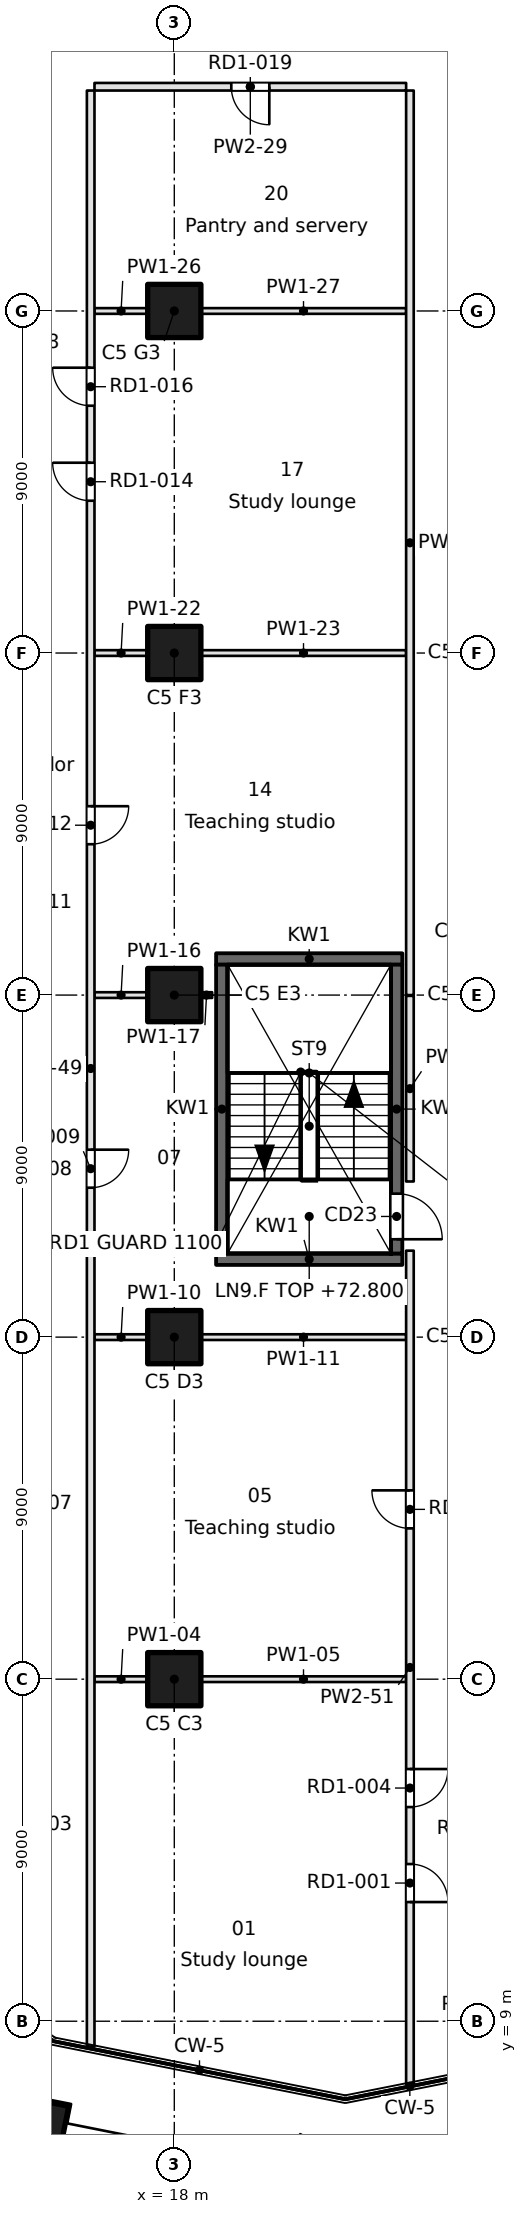
"""IFC4 building model, lengths in metres.
Left out: names, types, materials, properties, quantities, classifications, styles, units other than length and angle.
Written with IfcOpenShell. Run it as: python <this file> out.ifc"""

import sys

from ifc_helpers import new_model, si_unit, direction, frame, frame_2d, origin, origin_2d, place, context, subcontext, project, spatial, rectangle, extrude, element, fill, save


model = new_model("IFC4")
c1 = context("Model", 3, precision=1e-05, world=origin(), true_north=direction((0.0, 1.0)))
c2 = subcontext(c1, "Body", "Model", "MODEL_VIEW")
j1 = project(units=[si_unit("LENGTHUNIT", "METRE"), si_unit("PLANEANGLEUNIT", "RADIAN")], contexts=[c1])
p1 = place(None, origin())
s1 = spatial("IfcSite", under=j1, at=p1, CompositionType="ELEMENT")
p2 = place(p1, origin())
s2 = spatial("IfcBuilding", under=s1, at=p2, CompositionType="ELEMENT")
p3 = place(p2, frame((0.0, 0.0, 72.8)))
s3 = spatial("IfcBuildingStorey", under=s2, at=p3, CompositionType="ELEMENT", Elevation=72.8)
p4 = place(p3, frame((13.89, 6.213, 0.0), z_axis=(0.0, 0.0, 1.0), x_axis=(-0.980785280403, 0.195090322016, 0.0)))
e1 = element("IfcColumn", 1, at=p4, inside=s3, PredefinedType="COLUMN", context=c2, shape_type="SweptSolid", body=[
    extrude(rectangle(XDim=2.4, YDim=1.6, at=origin_2d()), origin(), (0.0, 0.0, 1.0), 3.7),
])
for number, where, z_axis, x_axis in (
    (2, (18.0, 18.0, 0.0), (0.0, 0.0, 1.0), (1.0, 0.0, 0.0)),
    (3, (18.0, 27.0, 0.0), (0.0, 0.0, 1.0), (1.0, 0.0, 0.0)),
    (4, (18.0, 36.0, 0.0), (0.0, 0.0, 1.0), (1.0, 0.0, 0.0)),
    (5, (18.0, 45.0, 0.0), (0.0, 0.0, 1.0), (1.0, 0.0, 0.0)),
    (6, (18.0, 54.0, 0.0), (0.0, 0.0, 1.0), (1.0, 0.0, 0.0)),
):
    element("IfcColumn", number, at=place(p3, frame(where, z_axis=z_axis, x_axis=x_axis)), inside=s3, PredefinedType="COLUMN", context=c2, shape_type="SweptSolid", body=[
        extrude(rectangle(XDim=1.4, YDim=1.4, at=origin_2d()), origin(), (0.0, 0.0, 1.0), 3.7),
    ])
for number, where, z_axis, x_axis in (
    (7, (19.1, 29.05, -0.4), (0.0, 0.0, 1.0), (1.0, 0.0, 0.0)),
    (8, (19.1, 36.95, -0.4), (0.0, 0.0, 1.0), (1.0, 0.0, 0.0)),
):
    element("IfcWall", number, at=place(p3, frame(where, z_axis=z_axis, x_axis=x_axis)), inside=s3, PredefinedType="SOLIDWALL", context=c2, shape_type="SweptSolid", body=[
        extrude(rectangle(XDim=4.9, YDim=0.3, at=frame_2d((2.45, 0.0))), origin(), (0.0, 0.0, 1.0), 3.7),
    ])
p5 = place(p3, frame((19.25, 29.2, -0.4), z_axis=(0.0, 0.0, 1.0), x_axis=(0.0, 1.0, 0.0)))
e9 = element("IfcWall", 9, at=p5, inside=s3, PredefinedType="SOLIDWALL", context=c2, shape_type="SweptSolid", body=[
    extrude(rectangle(XDim=7.6, YDim=0.3, at=frame_2d((3.8, 0.0))), origin(), (0.0, 0.0, 1.0), 3.7),
])
p6 = place(p3, frame((23.85, 29.2, -0.4), z_axis=(0.0, 0.0, 1.0), x_axis=(0.0, 1.0, 0.0)))
e10 = element("IfcWall", 10, at=p6, inside=s3, PredefinedType="SOLIDWALL", context=c2, shape_type="SweptSolid", body=[
    extrude(rectangle(XDim=7.6, YDim=0.3, at=frame_2d((3.8, 0.0))), origin(), (0.0, 0.0, 1.0), 3.7),
])
p7 = place(p6, frame((0.375, 0.0, 0.4)))
e11 = element("IfcOpeningElement", 11, at=p7, cuts=e10, PredefinedType="OPENING", context=c2, shape_type="SweptSolid", body=[
    extrude(rectangle(XDim=1.2, YDim=2.1, at=frame_2d((0.6, 1.05))), frame((0.0, 0.15, 0.0), z_axis=(0.0, -1.0, 0.0), x_axis=(1.0, 0.0, 0.0)), (0.0, 0.0, 1.0), 0.3),
])
p8 = place(p3, frame((15.9, 18.0, 0.0), z_axis=(0.0, 0.0, 1.0), x_axis=(1.0, 0.0, 0.0)))
e12 = element("IfcWall", 12, at=p8, inside=s3, PredefinedType="PARTITIONING", context=c2, shape_type="SweptSolid", body=[
    extrude(rectangle(XDim=1.4, YDim=0.15, at=frame_2d((0.7, 0.0))), origin(), (0.0, 0.0, 1.0), 3.3),
])
p9 = place(p3, frame((18.7, 18.0, 0.0), z_axis=(0.0, 0.0, 1.0), x_axis=(1.0, 0.0, 0.0)))
e13 = element("IfcWall", 13, at=p9, inside=s3, PredefinedType="PARTITIONING", context=c2, shape_type="SweptSolid", body=[
    extrude(rectangle(XDim=5.4, YDim=0.15, at=frame_2d((2.7, 0.0))), origin(), (0.0, 0.0, 1.0), 3.3),
])
p10 = place(p3, frame((15.9, 27.0, 0.0), z_axis=(0.0, 0.0, 1.0), x_axis=(1.0, 0.0, 0.0)))
e14 = element("IfcWall", 14, at=p10, inside=s3, PredefinedType="PARTITIONING", context=c2, shape_type="SweptSolid", body=[
    extrude(rectangle(XDim=1.4, YDim=0.15, at=frame_2d((0.7, 0.0))), origin(), (0.0, 0.0, 1.0), 3.3),
])
p11 = place(p3, frame((18.7, 27.0, 0.0), z_axis=(0.0, 0.0, 1.0), x_axis=(1.0, 0.0, 0.0)))
e15 = element("IfcWall", 15, at=p11, inside=s3, PredefinedType="PARTITIONING", context=c2, shape_type="SweptSolid", body=[
    extrude(rectangle(XDim=5.4, YDim=0.15, at=frame_2d((2.7, 0.0))), origin(), (0.0, 0.0, 1.0), 3.3),
])
p12 = place(p3, frame((15.9, 36.0, 0.0), z_axis=(0.0, 0.0, 1.0), x_axis=(1.0, 0.0, 0.0)))
e16 = element("IfcWall", 16, at=p12, inside=s3, PredefinedType="PARTITIONING", context=c2, shape_type="SweptSolid", body=[
    extrude(rectangle(XDim=1.4, YDim=0.15, at=frame_2d((0.7, 0.0))), origin(), (0.0, 0.0, 1.0), 3.3),
])
p13 = place(p3, frame((18.7, 36.0, 0.0), z_axis=(0.0, 0.0, 1.0), x_axis=(1.0, 0.0, 0.0)))
e17 = element("IfcWall", 17, at=p13, inside=s3, PredefinedType="PARTITIONING", context=c2, shape_type="SweptSolid", body=[
    extrude(rectangle(XDim=0.296, YDim=0.15, at=frame_2d((0.148, 0.0))), origin(), (0.0, 0.0, 1.0), 3.3),
])
p14 = place(p3, frame((15.9, 45.0, 0.0), z_axis=(0.0, 0.0, 1.0), x_axis=(1.0, 0.0, 0.0)))
e18 = element("IfcWall", 18, at=p14, inside=s3, PredefinedType="PARTITIONING", context=c2, shape_type="SweptSolid", body=[
    extrude(rectangle(XDim=1.4, YDim=0.15, at=frame_2d((0.7, 0.0))), origin(), (0.0, 0.0, 1.0), 3.3),
])
p15 = place(p3, frame((18.7, 45.0, 0.0), z_axis=(0.0, 0.0, 1.0), x_axis=(1.0, 0.0, 0.0)))
e19 = element("IfcWall", 19, at=p15, inside=s3, PredefinedType="PARTITIONING", context=c2, shape_type="SweptSolid", body=[
    extrude(rectangle(XDim=5.4, YDim=0.15, at=frame_2d((2.7, 0.0))), origin(), (0.0, 0.0, 1.0), 3.3),
])
p16 = place(p3, frame((15.9, 54.0, 0.0), z_axis=(0.0, 0.0, 1.0), x_axis=(1.0, 0.0, 0.0)))
e20 = element("IfcWall", 20, at=p16, inside=s3, PredefinedType="PARTITIONING", context=c2, shape_type="SweptSolid", body=[
    extrude(rectangle(XDim=1.4, YDim=0.15, at=frame_2d((0.7, 0.0))), origin(), (0.0, 0.0, 1.0), 3.3),
])
p17 = place(p3, frame((18.7, 54.0, 0.0), z_axis=(0.0, 0.0, 1.0), x_axis=(1.0, 0.0, 0.0)))
e21 = element("IfcWall", 21, at=p17, inside=s3, PredefinedType="PARTITIONING", context=c2, shape_type="SweptSolid", body=[
    extrude(rectangle(XDim=5.4, YDim=0.15, at=frame_2d((2.7, 0.0))), origin(), (0.0, 0.0, 1.0), 3.3),
])
p18 = place(p3, frame((24.1, 59.9, 0.0), z_axis=(0.0, 0.0, 1.0), x_axis=(-1.0, 0.0, 0.0)))
e22 = element("IfcWall", 22, at=p18, inside=s3, PredefinedType="PARTITIONING", context=c2, shape_type="SweptSolid", body=[
    extrude(rectangle(XDim=8.2, YDim=0.2, at=frame_2d((4.1, 0.0))), origin(), (0.0, 0.0, 1.0), 3.3),
])
p19 = place(p18, frame((3.6, 0.0, 0.0)))
e23 = element("IfcOpeningElement", 23, at=p19, cuts=e22, PredefinedType="OPENING", context=c2, shape_type="SweptSolid", body=[
    extrude(rectangle(XDim=1.0, YDim=2.1, at=frame_2d((0.5, 1.05))), frame((0.0, 0.1, 0.0), z_axis=(0.0, -1.0, 0.0), x_axis=(1.0, 0.0, 0.0)), (0.0, 0.0, 1.0), 0.2),
])
p20 = place(p3, frame((15.8, 59.8, 0.0), z_axis=(0.0, 0.0, 1.0), x_axis=(0.0, -1.0, 0.0)))
e24 = element("IfcWall", 24, at=p20, inside=s3, PredefinedType="PARTITIONING", context=c2, shape_type="SweptSolid", body=[
    extrude(rectangle(XDim=51.464, YDim=0.2, at=frame_2d((25.732, 0.0))), origin(), (0.0, 0.0, 1.0), 3.3),
])
p21 = place(p20, frame((27.868, 0.0, 0.0)))
e25 = element("IfcOpeningElement", 25, at=p21, cuts=e24, PredefinedType="OPENING", context=c2, shape_type="SweptSolid", body=[
    extrude(rectangle(XDim=1.0, YDim=2.1, at=frame_2d((0.5, 1.05))), frame((0.0, 0.1, 0.0), z_axis=(0.0, -1.0, 0.0), x_axis=(1.0, 0.0, 0.0)), (0.0, 0.0, 1.0), 0.2),
])
p22 = place(p20, frame((18.831, 0.0, 0.0)))
e26 = element("IfcOpeningElement", 26, at=p22, cuts=e24, PredefinedType="OPENING", context=c2, shape_type="SweptSolid", body=[
    extrude(rectangle(XDim=1.0, YDim=2.1, at=frame_2d((0.5, 1.05))), frame((0.0, 0.1, 0.0), z_axis=(0.0, -1.0, 0.0), x_axis=(1.0, 0.0, 0.0)), (0.0, 0.0, 1.0), 0.2),
])
p23 = place(p20, frame((9.793, 0.0, 0.0)))
e27 = element("IfcOpeningElement", 27, at=p23, cuts=e24, PredefinedType="OPENING", context=c2, shape_type="SweptSolid", body=[
    extrude(rectangle(XDim=1.0, YDim=2.1, at=frame_2d((0.5, 1.05))), frame((0.0, 0.1, 0.0), z_axis=(0.0, -1.0, 0.0), x_axis=(1.0, 0.0, 0.0)), (0.0, 0.0, 1.0), 0.2),
])
p24 = place(p20, frame((7.293, 0.0, 0.0)))
e28 = element("IfcOpeningElement", 28, at=p24, cuts=e24, PredefinedType="OPENING", context=c2, shape_type="SweptSolid", body=[
    extrude(rectangle(XDim=1.0, YDim=2.1, at=frame_2d((0.5, 1.05))), frame((0.0, 0.1, 0.0), z_axis=(0.0, -1.0, 0.0), x_axis=(1.0, 0.0, 0.0)), (0.0, 0.0, 1.0), 0.2),
])
p25 = place(p3, frame((24.2, 31.095, 0.0), z_axis=(0.0, 0.0, 1.0), x_axis=(0.0, 1.0, 0.0)))
e29 = element("IfcWall", 29, at=p25, inside=s3, PredefinedType="PARTITIONING", context=c2, shape_type="SweptSolid", body=[
    extrude(rectangle(XDim=4.884, YDim=0.2, at=frame_2d((2.442, 0.0))), origin(), (0.0, 0.0, 1.0), 3.3),
])
p26 = place(p3, frame((24.2, 7.341, 0.0), z_axis=(0.0, 0.0, 1.0), x_axis=(0.0, 1.0, 0.0)))
e30 = element("IfcWall", 30, at=p26, inside=s3, PredefinedType="PARTITIONING", context=c2, shape_type="SweptSolid", body=[
    extrude(rectangle(XDim=21.934, YDim=0.2, at=frame_2d((10.967, 0.0))), origin(), (0.0, 0.0, 1.0), 3.3),
])
p27 = place(p26, frame((4.794, 0.0, 0.0)))
e31 = element("IfcOpeningElement", 31, at=p27, cuts=e30, PredefinedType="OPENING", context=c2, shape_type="SweptSolid", body=[
    extrude(rectangle(XDim=1.0, YDim=2.1, at=frame_2d((0.5, 1.05))), frame((0.0, 0.1, 0.0), z_axis=(0.0, -1.0, 0.0), x_axis=(1.0, 0.0, 0.0)), (0.0, 0.0, 1.0), 0.2),
])
p28 = place(p26, frame((7.294, 0.0, 0.0)))
e32 = element("IfcOpeningElement", 32, at=p28, cuts=e30, PredefinedType="OPENING", context=c2, shape_type="SweptSolid", body=[
    extrude(rectangle(XDim=1.0, YDim=2.1, at=frame_2d((0.5, 1.05))), frame((0.0, 0.1, 0.0), z_axis=(0.0, -1.0, 0.0), x_axis=(1.0, 0.0, 0.0)), (0.0, 0.0, 1.0), 0.2),
])
p29 = place(p26, frame((14.627, 0.0, 0.0)))
e33 = element("IfcOpeningElement", 33, at=p29, cuts=e30, PredefinedType="OPENING", context=c2, shape_type="SweptSolid", body=[
    extrude(rectangle(XDim=1.0, YDim=2.1, at=frame_2d((0.5, 1.05))), frame((0.0, 0.1, 0.0), z_axis=(0.0, -1.0, 0.0), x_axis=(1.0, 0.0, 0.0)), (0.0, 0.0, 1.0), 0.2),
])
p30 = place(p3, frame((24.2, 36.0, 0.0), z_axis=(0.0, 0.0, 1.0), x_axis=(0.0, 1.0, 0.0)))
e34 = element("IfcWall", 34, at=p30, inside=s3, PredefinedType="PARTITIONING", context=c2, shape_type="SweptSolid", body=[
    extrude(rectangle(XDim=23.8, YDim=0.2, at=frame_2d((11.9, 0.0))), origin(), (0.0, 0.0, 1.0), 3.3),
])
p31 = place(p7, frame((1.2, 0.0, 0.0), z_axis=(0.0, 0.0, 1.0), x_axis=(-1.0, 0.0, 0.0)))
e35 = element("IfcDoor", 35, at=p31, inside=s3, OperationType="SINGLE_SWING_RIGHT", PredefinedType="DOOR", context=c2, shape_type="SweptSolid", body=[
    extrude(rectangle(XDim=1.2, YDim=2.1, at=frame_2d((0.6, 1.05))), frame((0.0, 0.025, 0.0), z_axis=(0.0, -1.0, 0.0), x_axis=(1.0, 0.0, 0.0)), (0.0, 0.0, 1.0), 0.05),
])
fill(e11, e35)
p32 = place(p27, frame((1.0, 0.0, 0.0), z_axis=(0.0, 0.0, 1.0), x_axis=(-1.0, 0.0, 0.0)))
e36 = element("IfcDoor", 36, at=p32, inside=s3, OperationType="SINGLE_SWING_RIGHT", PredefinedType="DOOR", context=c2, shape_type="SweptSolid", body=[
    extrude(rectangle(XDim=1.0, YDim=2.1, at=frame_2d((0.5, 1.05))), frame((0.0, 0.025, 0.0), z_axis=(0.0, -1.0, 0.0), x_axis=(1.0, 0.0, 0.0)), (0.0, 0.0, 1.0), 0.05),
])
fill(e31, e36)
p33 = place(p28, frame((1.0, 0.0, 0.0), z_axis=(0.0, 0.0, 1.0), x_axis=(-1.0, 0.0, 0.0)))
e37 = element("IfcDoor", 37, at=p33, inside=s3, OperationType="SINGLE_SWING_LEFT", PredefinedType="DOOR", context=c2, shape_type="SweptSolid", body=[
    extrude(rectangle(XDim=1.0, YDim=2.1, at=frame_2d((0.5, 1.05))), frame((0.0, 0.025, 0.0), z_axis=(0.0, -1.0, 0.0), x_axis=(1.0, 0.0, 0.0)), (0.0, 0.0, 1.0), 0.05),
])
fill(e32, e37)
p34 = place(p29, origin())
e38 = element("IfcDoor", 38, at=p34, inside=s3, OperationType="SINGLE_SWING_RIGHT", PredefinedType="DOOR", context=c2, shape_type="SweptSolid", body=[
    extrude(rectangle(XDim=1.0, YDim=2.1, at=frame_2d((0.5, 1.05))), frame((0.0, 0.025, 0.0), z_axis=(0.0, -1.0, 0.0), x_axis=(1.0, 0.0, 0.0)), (0.0, 0.0, 1.0), 0.05),
])
fill(e33, e38)
p35 = place(p21, origin())
e39 = element("IfcDoor", 39, at=p35, inside=s3, OperationType="SINGLE_SWING_LEFT", PredefinedType="DOOR", context=c2, shape_type="SweptSolid", body=[
    extrude(rectangle(XDim=1.0, YDim=2.1, at=frame_2d((0.5, 1.05))), frame((0.0, 0.025, 0.0), z_axis=(0.0, -1.0, 0.0), x_axis=(1.0, 0.0, 0.0)), (0.0, 0.0, 1.0), 0.05),
])
fill(e25, e39)
p36 = place(p22, origin())
e40 = element("IfcDoor", 40, at=p36, inside=s3, OperationType="SINGLE_SWING_LEFT", PredefinedType="DOOR", context=c2, shape_type="SweptSolid", body=[
    extrude(rectangle(XDim=1.0, YDim=2.1, at=frame_2d((0.5, 1.05))), frame((0.0, 0.025, 0.0), z_axis=(0.0, -1.0, 0.0), x_axis=(1.0, 0.0, 0.0)), (0.0, 0.0, 1.0), 0.05),
])
fill(e26, e40)
p37 = place(p23, frame((1.0, 0.0, 0.0), z_axis=(0.0, 0.0, 1.0), x_axis=(-1.0, 0.0, 0.0)))
e41 = element("IfcDoor", 41, at=p37, inside=s3, OperationType="SINGLE_SWING_RIGHT", PredefinedType="DOOR", context=c2, shape_type="SweptSolid", body=[
    extrude(rectangle(XDim=1.0, YDim=2.1, at=frame_2d((0.5, 1.05))), frame((0.0, 0.025, 0.0), z_axis=(0.0, -1.0, 0.0), x_axis=(1.0, 0.0, 0.0)), (0.0, 0.0, 1.0), 0.05),
])
fill(e27, e41)
p38 = place(p24, frame((1.0, 0.0, 0.0), z_axis=(0.0, 0.0, 1.0), x_axis=(-1.0, 0.0, 0.0)))
e42 = element("IfcDoor", 42, at=p38, inside=s3, OperationType="SINGLE_SWING_RIGHT", PredefinedType="DOOR", context=c2, shape_type="SweptSolid", body=[
    extrude(rectangle(XDim=1.0, YDim=2.1, at=frame_2d((0.5, 1.05))), frame((0.0, 0.025, 0.0), z_axis=(0.0, -1.0, 0.0), x_axis=(1.0, 0.0, 0.0)), (0.0, 0.0, 1.0), 0.05),
])
fill(e28, e42)
p39 = place(p19, origin())
e43 = element("IfcDoor", 43, at=p39, inside=s3, OperationType="SINGLE_SWING_LEFT", PredefinedType="DOOR", context=c2, shape_type="SweptSolid", body=[
    extrude(rectangle(XDim=1.0, YDim=2.1, at=frame_2d((0.5, 1.05))), frame((0.0, 0.025, 0.0), z_axis=(0.0, -1.0, 0.0), x_axis=(1.0, 0.0, 0.0)), (0.0, 0.0, 1.0), 0.05),
])
fill(e23, e43)
save(model, sys.argv[1])
